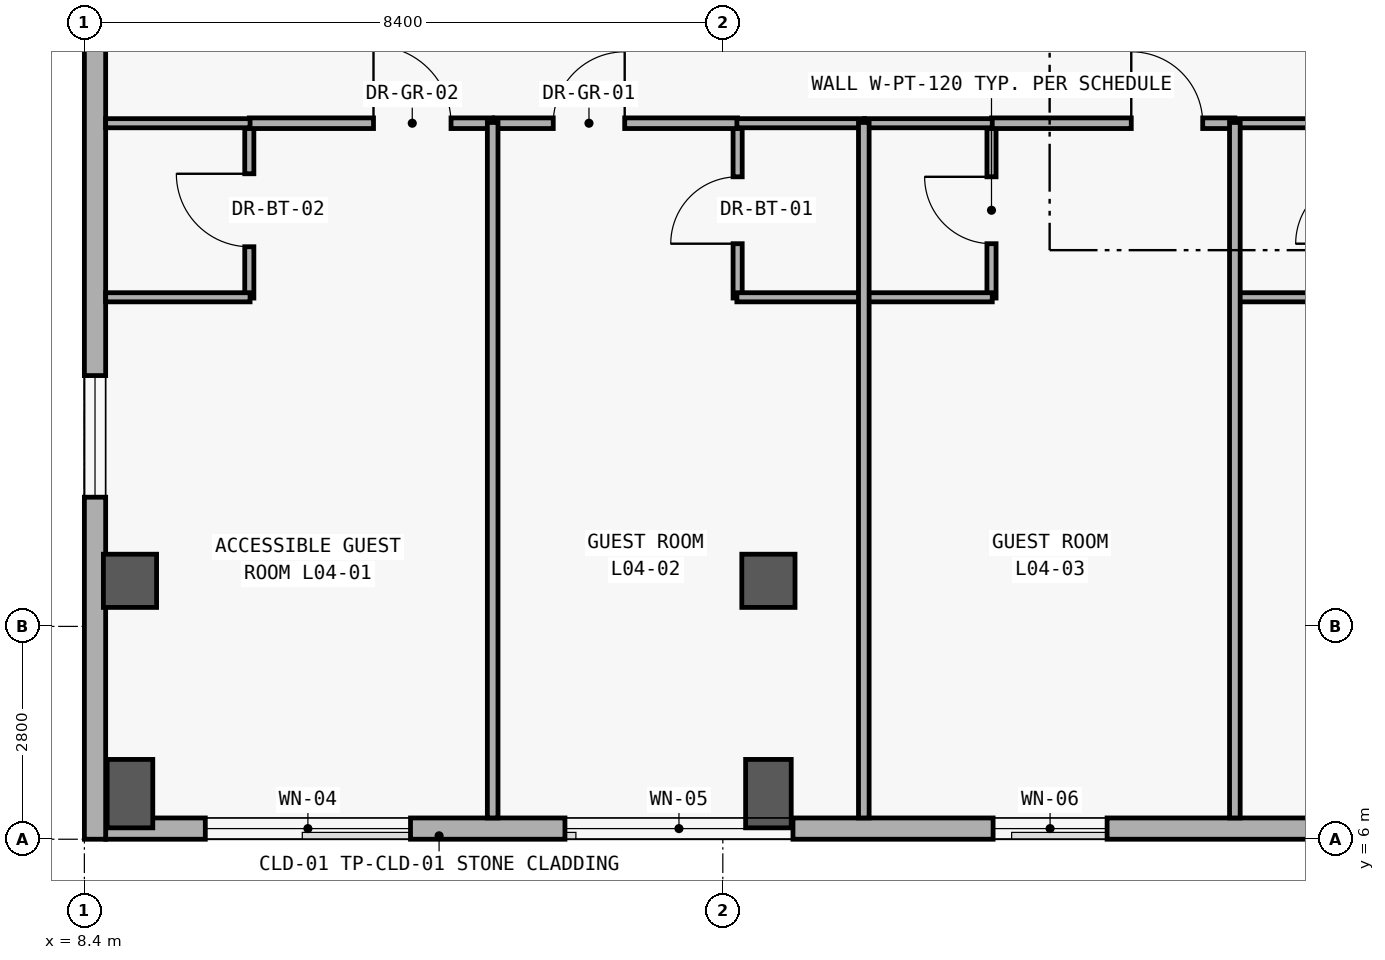
"""IFC4 building model, lengths in metres.
Left out: names, types, materials, properties, quantities, classifications, styles, units other than length and angle.
Written with IfcOpenShell. Run it as: python <this file> out.ifc"""

import sys

from ifc_helpers import new_model, si_unit, direction, frame, frame_2d, origin, origin_2d, place, context, subcontext, project, spatial, rectangle, extrude, element, fill, save


model = new_model("IFC4")
c1 = context("Model", 3, precision=1e-05, world=origin(), true_north=direction((0.0, 1.0)))
c2 = subcontext(c1, "Body", "Model", "MODEL_VIEW")
j1 = project(units=[si_unit("LENGTHUNIT", "METRE"), si_unit("PLANEANGLEUNIT", "RADIAN")], contexts=[c1])
p1 = place(None, origin())
s1 = spatial("IfcSite", under=j1, at=p1, CompositionType="ELEMENT")
p2 = place(p1, origin())
s2 = spatial("IfcBuilding", under=s1, at=p2, CompositionType="ELEMENT")
p3 = place(p2, frame((0.0, 0.0, 19.2)))
s3 = spatial("IfcBuildingStorey", under=s2, at=p3, CompositionType="ELEMENT", Elevation=19.2)
p4 = place(p3, frame((9.0, 6.6, 0.0), z_axis=(0.0, 0.0, 1.0), x_axis=(0.0, 1.0, 0.0)))
e1 = element("IfcColumn", 1, at=p4, inside=s3, PredefinedType="COLUMN", context=c2, shape_type="SweptSolid", body=[
    extrude(rectangle(XDim=0.6, YDim=0.9, at=origin_2d()), origin(), (0.0, 0.0, 1.0), 3.6),
])
p5 = place(p3, frame((9.0, 9.4, 0.0), z_axis=(0.0, 0.0, 1.0), x_axis=(1.0, 0.0, 0.0)))
e2 = element("IfcColumn", 2, at=p5, inside=s3, PredefinedType="COLUMN", context=c2, shape_type="SweptSolid", body=[
    extrude(rectangle(XDim=0.7, YDim=0.7, at=origin_2d()), origin(), (0.0, 0.0, 1.0), 3.6),
])
p6 = place(p3, frame((17.4, 6.6, 0.0), z_axis=(0.0, 0.0, 1.0), x_axis=(0.0, 1.0, 0.0)))
e3 = element("IfcColumn", 3, at=p6, inside=s3, PredefinedType="COLUMN", context=c2, shape_type="SweptSolid", body=[
    extrude(rectangle(XDim=0.6, YDim=0.9, at=origin_2d()), origin(), (0.0, 0.0, 1.0), 3.6),
])
p7 = place(p3, frame((17.4, 9.4, 0.0), z_axis=(0.0, 0.0, 1.0), x_axis=(1.0, 0.0, 0.0)))
e4 = element("IfcColumn", 4, at=p7, inside=s3, PredefinedType="COLUMN", context=c2, shape_type="SweptSolid", body=[
    extrude(rectangle(XDim=0.7, YDim=0.7, at=origin_2d()), origin(), (0.0, 0.0, 1.0), 3.6),
])
p8 = place(p3, frame((92.12, 6.14, 0.0), z_axis=(0.0, 0.0, 1.0), x_axis=(-1.0, 0.0, 0.0)))
e5 = element("IfcWall", 5, at=p8, inside=s3, PredefinedType="SOLIDWALL", context=c2, shape_type="SweptSolid", body=[
    extrude(rectangle(XDim=83.44, YDim=0.28, at=frame_2d((41.72, 0.0))), origin(), (0.0, 0.0, 1.0), 3.32),
])
p9 = place(p8, frame((79.429, 0.0, 0.85)))
e6 = element("IfcOpeningElement", 6, at=p9, cuts=e5, PredefinedType="OPENING", context=c2, shape_type="SweptSolid", body=[
    extrude(rectangle(XDim=2.7, YDim=1.85, at=frame_2d((1.35, 0.925))), frame((0.0, 0.15, 0.0), z_axis=(0.0, -1.0, 0.0), x_axis=(1.0, 0.0, 0.0)), (0.0, 0.0, 1.0), 0.3),
])
p10 = place(p8, frame((74.397, 0.0, 0.85)))
e7 = element("IfcOpeningElement", 7, at=p10, cuts=e5, PredefinedType="OPENING", context=c2, shape_type="SweptSolid", body=[
    extrude(rectangle(XDim=3.0, YDim=1.9, at=frame_2d((1.5, 0.95))), frame((0.0, 0.15, 0.0), z_axis=(0.0, -1.0, 0.0), x_axis=(1.0, 0.0, 0.0)), (0.0, 0.0, 1.0), 0.3),
])
p11 = place(p8, frame((70.264, 0.0, 0.85)))
e8 = element("IfcOpeningElement", 8, at=p11, cuts=e5, PredefinedType="OPENING", context=c2, shape_type="SweptSolid", body=[
    extrude(rectangle(XDim=1.5, YDim=1.75, at=frame_2d((0.75, 0.875))), frame((0.0, 0.15, 0.0), z_axis=(0.0, -1.0, 0.0), x_axis=(1.0, 0.0, 0.0)), (0.0, 0.0, 1.0), 0.3),
])
p12 = place(p8, frame((65.307, 0.0, 0.85)))
e9 = element("IfcOpeningElement", 9, at=p12, cuts=e5, PredefinedType="OPENING", context=c2, shape_type="SweptSolid", body=[
    extrude(rectangle(XDim=1.65, YDim=1.75, at=frame_2d((0.825, 0.875))), frame((0.0, 0.15, 0.0), z_axis=(0.0, -1.0, 0.0), x_axis=(1.0, 0.0, 0.0)), (0.0, 0.0, 1.0), 0.3),
])
p13 = place(p8, frame((60.275, 0.0, 0.85)))
e10 = element("IfcOpeningElement", 10, at=p13, cuts=e5, PredefinedType="OPENING", context=c2, shape_type="SweptSolid", body=[
    extrude(rectangle(XDim=1.95, YDim=1.75, at=frame_2d((0.975, 0.875))), frame((0.0, 0.15, 0.0), z_axis=(0.0, -1.0, 0.0), x_axis=(1.0, 0.0, 0.0)), (0.0, 0.0, 1.0), 0.3),
])
p14 = place(p8, frame((55.242, 0.0, 0.85)))
e11 = element("IfcOpeningElement", 11, at=p14, cuts=e5, PredefinedType="OPENING", context=c2, shape_type="SweptSolid", body=[
    extrude(rectangle(XDim=2.25, YDim=1.75, at=frame_2d((1.125, 0.875))), frame((0.0, 0.15, 0.0), z_axis=(0.0, -1.0, 0.0), x_axis=(1.0, 0.0, 0.0)), (0.0, 0.0, 1.0), 0.3),
])
p15 = place(p8, frame((50.21, 0.0, 0.85)))
e12 = element("IfcOpeningElement", 12, at=p15, cuts=e5, PredefinedType="OPENING", context=c2, shape_type="SweptSolid", body=[
    extrude(rectangle(XDim=2.55, YDim=1.8, at=frame_2d((1.275, 0.9))), frame((0.0, 0.15, 0.0), z_axis=(0.0, -1.0, 0.0), x_axis=(1.0, 0.0, 0.0)), (0.0, 0.0, 1.0), 0.3),
])
p16 = place(p8, frame((45.178, 0.0, 0.85)))
e13 = element("IfcOpeningElement", 13, at=p16, cuts=e5, PredefinedType="OPENING", context=c2, shape_type="SweptSolid", body=[
    extrude(rectangle(XDim=2.85, YDim=1.85, at=frame_2d((1.425, 0.925))), frame((0.0, 0.15, 0.0), z_axis=(0.0, -1.0, 0.0), x_axis=(1.0, 0.0, 0.0)), (0.0, 0.0, 1.0), 0.3),
])
p17 = place(p8, frame((40.12, 0.0, 0.85)))
e14 = element("IfcOpeningElement", 14, at=p17, cuts=e5, PredefinedType="OPENING", context=c2, shape_type="SweptSolid", body=[
    extrude(rectangle(XDim=3.2, YDim=1.95, at=frame_2d((1.6, 0.975))), frame((0.0, 0.15, 0.0), z_axis=(0.0, -1.0, 0.0), x_axis=(1.0, 0.0, 0.0)), (0.0, 0.0, 1.0), 0.3),
])
p18 = place(p8, frame((35.088, 0.0, 0.85)))
e15 = element("IfcOpeningElement", 15, at=p18, cuts=e5, PredefinedType="OPENING", context=c2, shape_type="SweptSolid", body=[
    extrude(rectangle(XDim=3.5, YDim=2.0, at=frame_2d((1.75, 1.0))), frame((0.0, 0.15, 0.0), z_axis=(0.0, -1.0, 0.0), x_axis=(1.0, 0.0, 0.0)), (0.0, 0.0, 1.0), 0.3),
])
p19 = place(p8, frame((31.255, 0.0, 0.85)))
e16 = element("IfcOpeningElement", 16, at=p19, cuts=e5, PredefinedType="OPENING", context=c2, shape_type="SweptSolid", body=[
    extrude(rectangle(XDim=1.4, YDim=1.6, at=frame_2d((0.7, 0.8))), frame((0.0, 0.15, 0.0), z_axis=(0.0, -1.0, 0.0), x_axis=(1.0, 0.0, 0.0)), (0.0, 0.0, 1.0), 0.3),
])
p20 = place(p8, frame((26.273, 0.0, 0.85)))
e17 = element("IfcOpeningElement", 17, at=p20, cuts=e5, PredefinedType="OPENING", context=c2, shape_type="SweptSolid", body=[
    extrude(rectangle(XDim=1.6, YDim=1.6, at=frame_2d((0.8, 0.8))), frame((0.0, 0.15, 0.0), z_axis=(0.0, -1.0, 0.0), x_axis=(1.0, 0.0, 0.0)), (0.0, 0.0, 1.0), 0.3),
])
p21 = place(p8, frame((21.291, 0.0, 0.85)))
e18 = element("IfcOpeningElement", 18, at=p21, cuts=e5, PredefinedType="OPENING", context=c2, shape_type="SweptSolid", body=[
    extrude(rectangle(XDim=1.8, YDim=1.6, at=frame_2d((0.9, 0.8))), frame((0.0, 0.15, 0.0), z_axis=(0.0, -1.0, 0.0), x_axis=(1.0, 0.0, 0.0)), (0.0, 0.0, 1.0), 0.3),
])
p22 = place(p8, frame((16.308, 0.0, 0.85)))
e19 = element("IfcOpeningElement", 19, at=p22, cuts=e5, PredefinedType="OPENING", context=c2, shape_type="SweptSolid", body=[
    extrude(rectangle(XDim=2.0, YDim=1.65, at=frame_2d((1.0, 0.825))), frame((0.0, 0.15, 0.0), z_axis=(0.0, -1.0, 0.0), x_axis=(1.0, 0.0, 0.0)), (0.0, 0.0, 1.0), 0.3),
])
p23 = place(p8, frame((11.326, 0.0, 0.85)))
e20 = element("IfcOpeningElement", 20, at=p23, cuts=e5, PredefinedType="OPENING", context=c2, shape_type="SweptSolid", body=[
    extrude(rectangle(XDim=2.2, YDim=1.65, at=frame_2d((1.1, 0.825))), frame((0.0, 0.15, 0.0), z_axis=(0.0, -1.0, 0.0), x_axis=(1.0, 0.0, 0.0)), (0.0, 0.0, 1.0), 0.3),
])
p24 = place(p8, frame((6.243, 0.0, 0.85)))
e21 = element("IfcOpeningElement", 21, at=p24, cuts=e5, PredefinedType="OPENING", context=c2, shape_type="SweptSolid", body=[
    extrude(rectangle(XDim=2.6, YDim=2.2, at=frame_2d((1.3, 1.1))), frame((0.0, 0.15, 0.0), z_axis=(0.0, -1.0, 0.0), x_axis=(1.0, 0.0, 0.0)), (0.0, 0.0, 1.0), 0.3),
])
p25 = place(p8, frame((1.111, 0.0, 0.85)))
e22 = element("IfcOpeningElement", 22, at=p25, cuts=e5, PredefinedType="OPENING", context=c2, shape_type="SweptSolid", body=[
    extrude(rectangle(XDim=3.1, YDim=2.2, at=frame_2d((1.55, 1.1))), frame((0.0, 0.15, 0.0), z_axis=(0.0, -1.0, 0.0), x_axis=(1.0, 0.0, 0.0)), (0.0, 0.0, 1.0), 0.3),
])
p26 = place(p3, frame((8.54, 6.0, 0.0), z_axis=(0.0, 0.0, 1.0), x_axis=(0.0, 1.0, 0.0)))
e23 = element("IfcWall", 23, at=p26, inside=s3, PredefinedType="SOLIDWALL", context=c2, shape_type="SweptSolid", body=[
    extrude(rectangle(XDim=28.0, YDim=0.28, at=frame_2d((14.0, 0.0))), origin(), (0.0, 0.0, 1.0), 3.32),
])
p27 = place(p26, frame((4.5, 0.0, 0.95)))
e24 = element("IfcOpeningElement", 24, at=p27, cuts=e23, PredefinedType="OPENING", context=c2, shape_type="SweptSolid", body=[
    extrude(rectangle(XDim=1.6, YDim=1.6, at=frame_2d((0.8, 0.8))), frame((0.0, 0.15, 0.0), z_axis=(0.0, -1.0, 0.0), x_axis=(1.0, 0.0, 0.0)), (0.0, 0.0, 1.0), 0.3),
])
p28 = place(p3, frame((10.57, 13.12, 0.0), z_axis=(0.0, 0.0, 1.0), x_axis=(0.0, 1.0, 0.0)))
e25 = element("IfcWall", 25, at=p28, inside=s3, PredefinedType="PARTITIONING", context=c2, shape_type="SweptSolid", body=[
    extrude(rectangle(XDim=2.31, YDim=0.12, at=frame_2d((1.155, 0.0))), origin(), (0.0, 0.0, 1.0), 2.48),
])
p29 = place(p28, frame((0.675, 0.0, 0.0)))
e26 = element("IfcOpeningElement", 26, at=p29, cuts=e25, PredefinedType="OPENING", context=c2, shape_type="SweptSolid", body=[
    extrude(rectangle(XDim=0.96, YDim=2.15, at=frame_2d((0.48, 1.075))), frame((0.0, 0.07, 0.0), z_axis=(0.0, -1.0, 0.0), x_axis=(1.0, 0.0, 0.0)), (0.0, 0.0, 1.0), 0.14),
])
p30 = place(p3, frame((16.995, 13.12, 0.0), z_axis=(0.0, 0.0, 1.0), x_axis=(0.0, 1.0, 0.0)))
e27 = element("IfcWall", 27, at=p30, inside=s3, PredefinedType="PARTITIONING", context=c2, shape_type="SweptSolid", body=[
    extrude(rectangle(XDim=2.31, YDim=0.12, at=frame_2d((1.155, 0.0))), origin(), (0.0, 0.0, 1.0), 2.48),
])
p31 = place(p30, frame((0.715, 0.0, 0.0)))
e28 = element("IfcOpeningElement", 28, at=p31, cuts=e27, PredefinedType="OPENING", context=c2, shape_type="SweptSolid", body=[
    extrude(rectangle(XDim=0.88, YDim=2.15, at=frame_2d((0.44, 1.075))), frame((0.0, 0.07, 0.0), z_axis=(0.0, -1.0, 0.0), x_axis=(1.0, 0.0, 0.0)), (0.0, 0.0, 1.0), 0.14),
])
p32 = place(p3, frame((20.335, 13.12, 0.0), z_axis=(0.0, 0.0, 1.0), x_axis=(0.0, 1.0, 0.0)))
e29 = element("IfcWall", 29, at=p32, inside=s3, PredefinedType="PARTITIONING", context=c2, shape_type="SweptSolid", body=[
    extrude(rectangle(XDim=2.31, YDim=0.12, at=frame_2d((1.155, 0.0))), origin(), (0.0, 0.0, 1.0), 2.48),
])
p33 = place(p32, frame((0.715, 0.0, 0.0)))
e30 = element("IfcOpeningElement", 30, at=p33, cuts=e29, PredefinedType="OPENING", context=c2, shape_type="SweptSolid", body=[
    extrude(rectangle(XDim=0.88, YDim=2.15, at=frame_2d((0.44, 1.075))), frame((0.0, 0.07, 0.0), z_axis=(0.0, -1.0, 0.0), x_axis=(1.0, 0.0, 0.0)), (0.0, 0.0, 1.0), 0.14),
])
p34 = place(p3, frame((10.57, 15.42, 0.0), z_axis=(0.0, 0.0, 1.0), x_axis=(1.0, 0.0, 0.0)))
e31 = element("IfcWall", 31, at=p34, inside=s3, PredefinedType="PARTITIONING", context=c2, shape_type="SweptSolid", body=[
    extrude(rectangle(XDim=3.202, YDim=0.14, at=frame_2d((1.601, 0.0))), origin(), (0.0, 0.0, 1.0), 2.48),
])
p35 = place(p34, frame((1.634, 0.0, 0.0)))
e32 = element("IfcOpeningElement", 32, at=p35, cuts=e31, PredefinedType="OPENING", context=c2, shape_type="SweptSolid", body=[
    extrude(rectangle(XDim=1.02, YDim=2.2, at=frame_2d((0.51, 1.1))), frame((0.0, 0.08, 0.0), z_axis=(0.0, -1.0, 0.0), x_axis=(1.0, 0.0, 0.0)), (0.0, 0.0, 1.0), 0.16),
])
p36 = place(p3, frame((13.792, 15.42, 0.0), z_axis=(0.0, 0.0, 1.0), x_axis=(1.0, 0.0, 0.0)))
e33 = element("IfcWall", 33, at=p36, inside=s3, PredefinedType="PARTITIONING", context=c2, shape_type="SweptSolid", body=[
    extrude(rectangle(XDim=3.203, YDim=0.14, at=frame_2d((1.602, 0.0))), origin(), (0.0, 0.0, 1.0), 2.48),
])
p37 = place(p36, frame((0.777, 0.0, 0.0)))
e34 = element("IfcOpeningElement", 34, at=p37, cuts=e33, PredefinedType="OPENING", context=c2, shape_type="SweptSolid", body=[
    extrude(rectangle(XDim=0.94, YDim=2.2, at=frame_2d((0.47, 1.1))), frame((0.0, 0.08, 0.0), z_axis=(0.0, -1.0, 0.0), x_axis=(1.0, 0.0, 0.0)), (0.0, 0.0, 1.0), 0.16),
])
p38 = place(p3, frame((20.335, 15.42, 0.0), z_axis=(0.0, 0.0, 1.0), x_axis=(1.0, 0.0, 0.0)))
e35 = element("IfcWall", 35, at=p38, inside=s3, PredefinedType="PARTITIONING", context=c2, shape_type="SweptSolid", body=[
    extrude(rectangle(XDim=3.202, YDim=0.14, at=frame_2d((1.601, 0.0))), origin(), (0.0, 0.0, 1.0), 2.48),
])
p39 = place(p38, frame((1.839, 0.0, 0.0)))
e36 = element("IfcOpeningElement", 36, at=p39, cuts=e35, PredefinedType="OPENING", context=c2, shape_type="SweptSolid", body=[
    extrude(rectangle(XDim=0.94, YDim=2.2, at=frame_2d((0.47, 1.1))), frame((0.0, 0.08, 0.0), z_axis=(0.0, -1.0, 0.0), x_axis=(1.0, 0.0, 0.0)), (0.0, 0.0, 1.0), 0.16),
])
for number, where, z_axis, x_axis in (
    (37, (8.68, 13.13, 0.0), (0.0, 0.0, 1.0), (1.0, 0.0, 0.0)),
    (38, (8.68, 15.42, 0.0), (0.0, 0.0, 1.0), (1.0, 0.0, 0.0)),
):
    element("IfcWall", number, at=place(p3, frame(where, z_axis=z_axis, x_axis=x_axis)), inside=s3, PredefinedType="PARTITIONING", context=c2, shape_type="SweptSolid", body=[
        extrude(rectangle(XDim=1.9, YDim=0.12, at=frame_2d((0.95, 0.0))), origin(), (0.0, 0.0, 1.0), 2.48),
    ])
for number, where, z_axis, x_axis in (
    (39, (16.985, 13.13, 0.0), (0.0, 0.0, 1.0), (1.0, 0.0, 0.0)),
    (40, (16.985, 15.42, 0.0), (0.0, 0.0, 1.0), (1.0, 0.0, 0.0)),
    (41, (18.665, 13.13, 0.0), (0.0, 0.0, 1.0), (1.0, 0.0, 0.0)),
    (42, (18.665, 15.42, 0.0), (0.0, 0.0, 1.0), (1.0, 0.0, 0.0)),
    (43, (23.547, 13.13, 0.0), (0.0, 0.0, 1.0), (1.0, 0.0, 0.0)),
    (44, (23.547, 15.42, 0.0), (0.0, 0.0, 1.0), (1.0, 0.0, 0.0)),
):
    element("IfcWall", number, at=place(p3, frame(where, z_axis=z_axis, x_axis=x_axis)), inside=s3, PredefinedType="PARTITIONING", context=c2, shape_type="SweptSolid", body=[
        extrude(rectangle(XDim=1.68, YDim=0.12, at=frame_2d((0.84, 0.0))), origin(), (0.0, 0.0, 1.0), 2.48),
    ])
for number, where, z_axis, x_axis in (
    (45, (13.772, 6.28, 0.0), (0.0, 0.0, 1.0), (0.0, 1.0, 0.0)),
    (46, (18.655, 6.28, 0.0), (0.0, 0.0, 1.0), (0.0, 1.0, 0.0)),
    (47, (23.537, 6.28, 0.0), (0.0, 0.0, 1.0), (0.0, 1.0, 0.0)),
):
    element("IfcWall", number, at=place(p3, frame(where, z_axis=z_axis, x_axis=x_axis)), inside=s3, PredefinedType="PARTITIONING", context=c2, shape_type="SweptSolid", body=[
        extrude(rectangle(XDim=9.15, YDim=0.14, at=frame_2d((4.575, 0.0))), origin(), (0.0, 0.0, 1.0), 2.48),
    ])
p40 = place(p9, origin())
e48 = element("IfcWindow", 48, at=p40, inside=s3, PartitioningType="SINGLE_PANEL", PredefinedType="WINDOW", context=c2, shape_type="SweptSolid", body=[
    extrude(rectangle(XDim=2.7, YDim=1.85, at=frame_2d((1.35, 0.925))), frame((0.0, 0.03, 0.0), z_axis=(0.0, -1.0, 0.0), x_axis=(1.0, 0.0, 0.0)), (0.0, 0.0, 1.0), 0.06),
])
fill(e6, e48)
p41 = place(p10, origin())
e49 = element("IfcWindow", 49, at=p41, inside=s3, PartitioningType="SINGLE_PANEL", PredefinedType="WINDOW", context=c2, shape_type="SweptSolid", body=[
    extrude(rectangle(XDim=3.0, YDim=1.9, at=frame_2d((1.5, 0.95))), frame((0.0, 0.03, 0.0), z_axis=(0.0, -1.0, 0.0), x_axis=(1.0, 0.0, 0.0)), (0.0, 0.0, 1.0), 0.06),
])
fill(e7, e49)
p42 = place(p11, origin())
e50 = element("IfcWindow", 50, at=p42, inside=s3, PartitioningType="SINGLE_PANEL", PredefinedType="WINDOW", context=c2, shape_type="SweptSolid", body=[
    extrude(rectangle(XDim=1.5, YDim=1.75, at=frame_2d((0.75, 0.875))), frame((0.0, 0.03, 0.0), z_axis=(0.0, -1.0, 0.0), x_axis=(1.0, 0.0, 0.0)), (0.0, 0.0, 1.0), 0.06),
])
fill(e8, e50)
p43 = place(p27, origin())
e51 = element("IfcWindow", 51, at=p43, inside=s3, PartitioningType="SINGLE_PANEL", PredefinedType="WINDOW", context=c2, shape_type="SweptSolid", body=[
    extrude(rectangle(XDim=1.6, YDim=1.6, at=frame_2d((0.8, 0.8))), frame((0.0, 0.03, 0.0), z_axis=(0.0, -1.0, 0.0), x_axis=(1.0, 0.0, 0.0)), (0.0, 0.0, 1.0), 0.06),
])
fill(e24, e51)
p44 = place(p29, origin())
e52 = element("IfcDoor", 52, at=p44, inside=s3, OperationType="SINGLE_SWING_RIGHT", PredefinedType="DOOR", context=c2, shape_type="SweptSolid", body=[
    extrude(rectangle(XDim=0.96, YDim=2.15, at=frame_2d((0.48, 1.075))), frame((0.0, 0.025, 0.0), z_axis=(0.0, -1.0, 0.0), x_axis=(1.0, 0.0, 0.0)), (0.0, 0.0, 1.0), 0.05),
])
fill(e26, e52)
p45 = place(p31, origin())
e53 = element("IfcDoor", 53, at=p45, inside=s3, OperationType="SINGLE_SWING_LEFT", PredefinedType="DOOR", context=c2, shape_type="SweptSolid", body=[
    extrude(rectangle(XDim=0.88, YDim=2.15, at=frame_2d((0.44, 1.075))), frame((0.0, 0.025, 0.0), z_axis=(0.0, -1.0, 0.0), x_axis=(1.0, 0.0, 0.0)), (0.0, 0.0, 1.0), 0.05),
])
fill(e28, e53)
p46 = place(p33, origin())
e54 = element("IfcDoor", 54, at=p46, inside=s3, OperationType="SINGLE_SWING_RIGHT", PredefinedType="DOOR", context=c2, shape_type="SweptSolid", body=[
    extrude(rectangle(XDim=0.88, YDim=2.15, at=frame_2d((0.44, 1.075))), frame((0.0, 0.025, 0.0), z_axis=(0.0, -1.0, 0.0), x_axis=(1.0, 0.0, 0.0)), (0.0, 0.0, 1.0), 0.05),
])
fill(e30, e54)
p47 = place(p35, origin())
e55 = element("IfcDoor", 55, at=p47, inside=s3, OperationType="SINGLE_SWING_LEFT", PredefinedType="DOOR", context=c2, shape_type="SweptSolid", body=[
    extrude(rectangle(XDim=1.02, YDim=2.2, at=frame_2d((0.51, 1.1))), frame((0.0, 0.025, 0.0), z_axis=(0.0, -1.0, 0.0), x_axis=(1.0, 0.0, 0.0)), (0.0, 0.0, 1.0), 0.05),
])
fill(e32, e55)
p48 = place(p37, origin())
e56 = element("IfcDoor", 56, at=p48, inside=s3, OperationType="SINGLE_SWING_RIGHT", PredefinedType="DOOR", context=c2, shape_type="SweptSolid", body=[
    extrude(rectangle(XDim=0.94, YDim=2.2, at=frame_2d((0.47, 1.1))), frame((0.0, 0.025, 0.0), z_axis=(0.0, -1.0, 0.0), x_axis=(1.0, 0.0, 0.0)), (0.0, 0.0, 1.0), 0.05),
])
fill(e34, e56)
p49 = place(p39, origin())
e57 = element("IfcDoor", 57, at=p49, inside=s3, OperationType="SINGLE_SWING_LEFT", PredefinedType="DOOR", context=c2, shape_type="SweptSolid", body=[
    extrude(rectangle(XDim=0.94, YDim=2.2, at=frame_2d((0.47, 1.1))), frame((0.0, 0.025, 0.0), z_axis=(0.0, -1.0, 0.0), x_axis=(1.0, 0.0, 0.0)), (0.0, 0.0, 1.0), 0.05),
])
fill(e36, e57)
save(model, sys.argv[1])
